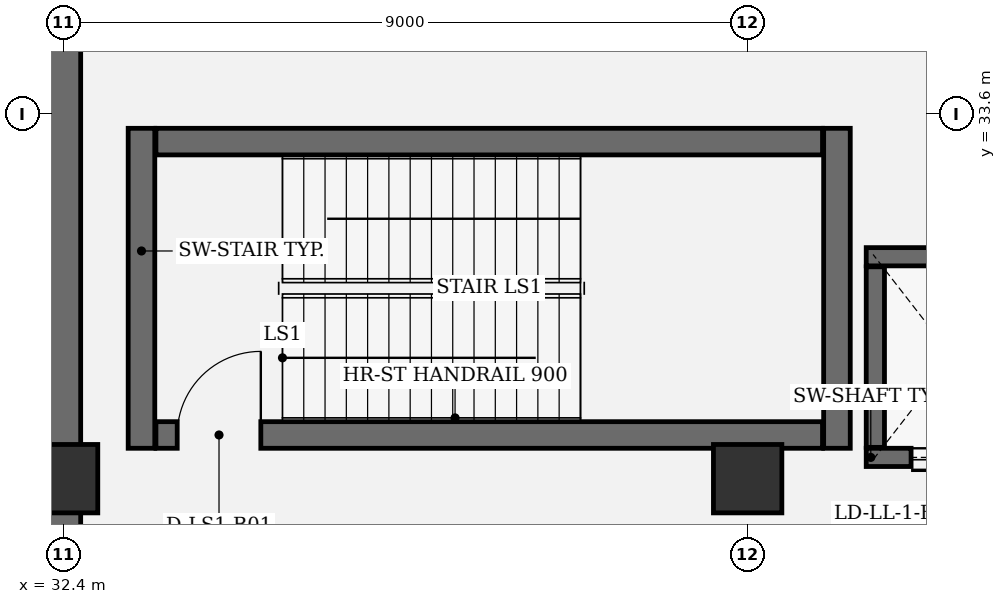
"""IFC4 building model, lengths in metres.
Left out: names, types, materials, properties, quantities, classifications, styles, units other than length and angle.
Written with IfcOpenShell. Run it as: python <this file> out.ifc"""

import sys

from ifc_helpers import new_model, si_unit, direction, frame, frame_2d, origin, origin_2d, place, context, subcontext, project, spatial, rectangle, extrude, element, fill, save


model = new_model("IFC4")
c1 = context("Model", 3, precision=1e-05, world=origin(), true_north=direction((0.0, 1.0)))
c2 = subcontext(c1, "Body", "Model", "MODEL_VIEW")
j1 = project(units=[si_unit("LENGTHUNIT", "METRE"), si_unit("PLANEANGLEUNIT", "RADIAN")], contexts=[c1])
p1 = place(None, origin())
s1 = spatial("IfcSite", under=j1, at=p1, CompositionType="ELEMENT")
p2 = place(p1, origin())
s2 = spatial("IfcBuilding", under=s1, at=p2, CompositionType="ELEMENT")
p3 = place(p2, frame((0.0, 0.0, -5.4)))
s3 = spatial("IfcBuildingStorey", under=s2, at=p3, CompositionType="ELEMENT", Elevation=-5.4)
p4 = place(p3, frame((32.4, 38.16, 0.0), z_axis=(0.0, 0.0, 1.0), x_axis=(0.0, -1.0, 0.0)))
e1 = element("IfcWall", 1, at=p4, inside=s3, PredefinedType="USERDEFINED", context=c2, shape_type="SweptSolid", body=[
    extrude(rectangle(XDim=76.32, YDim=0.45, at=frame_2d((38.16, 0.0))), origin(), (0.0, 0.0, 1.0), 4.35),
])
for number, where, z_axis, x_axis in (
    (2, (32.4, 28.8, 0.0), (0.0, 0.0, 1.0), (1.0, 0.0, 0.0)),
    (3, (41.4, 28.8, 0.0), (0.0, 0.0, 1.0), (1.0, 0.0, 0.0)),
):
    element("IfcColumn", number, at=place(p3, frame(where, z_axis=z_axis, x_axis=x_axis)), inside=s3, PredefinedType="COLUMN", context=c2, shape_type="SweptSolid", body=[
        extrude(rectangle(XDim=0.9, YDim=0.9, at=origin_2d()), origin(), (0.0, 0.0, 1.0), 5.4),
    ])
for number, where, z_axis, x_axis in (
    (4, (33.425, 33.41, 0.0), (0.0, 0.0, 1.0), (0.0, -1.0, 0.0)),
    (5, (42.575, 29.2, 0.0), (0.0, 0.0, 1.0), (0.0, 1.0, 0.0)),
):
    element("IfcWall", number, at=place(p3, frame(where, z_axis=z_axis, x_axis=x_axis)), inside=s3, PredefinedType="SHEAR", context=c2, shape_type="SweptSolid", body=[
        extrude(rectangle(XDim=4.21, YDim=0.35, at=frame_2d((2.105, 0.0))), origin(), (0.0, 0.0, 1.0), 5.395),
    ])
p5 = place(p3, frame((33.615, 29.375, 0.0), z_axis=(0.0, 0.0, 1.0), x_axis=(1.0, 0.0, 0.0)))
e6 = element("IfcWall", 6, at=p5, inside=s3, PredefinedType="SHEAR", context=c2, shape_type="SweptSolid", body=[
    extrude(rectangle(XDim=8.77, YDim=0.35, at=frame_2d((4.385, 0.0))), origin(), (0.0, 0.0, 1.0), 5.395),
])
p6 = place(p5, frame((0.28, 0.0, 0.0)))
e7 = element("IfcOpeningElement", 7, at=p6, cuts=e6, PredefinedType="OPENING", context=c2, shape_type="SweptSolid", body=[
    extrude(rectangle(XDim=1.1, YDim=2.2, at=frame_2d((0.55, 1.1))), frame((0.0, 0.185, 0.0), z_axis=(0.0, -1.0, 0.0), x_axis=(1.0, 0.0, 0.0)), (0.0, 0.0, 1.0), 0.37),
])
p7 = place(p3, frame((42.385, 33.235, 0.0), z_axis=(0.0, 0.0, 1.0), x_axis=(-1.0, 0.0, 0.0)))
e8 = element("IfcWall", 8, at=p7, inside=s3, PredefinedType="SHEAR", context=c2, shape_type="SweptSolid", body=[
    extrude(rectangle(XDim=8.77, YDim=0.35, at=frame_2d((4.385, 0.0))), origin(), (0.0, 0.0, 1.0), 5.395),
])
p8 = place(p3, frame((45.24, 29.08, 0.0), z_axis=(0.0, 0.0, 1.0), x_axis=(-1.0, 0.0, 0.0)))
e9 = element("IfcWall", 9, at=p8, inside=s3, PredefinedType="SHEAR", context=c2, shape_type="SweptSolid", body=[
    extrude(rectangle(XDim=2.28, YDim=0.24, at=frame_2d((1.14, 0.0))), origin(), (0.0, 0.0, 1.0), 5.1),
])
p9 = place(p8, frame((0.59, 0.0, 0.0)))
e10 = element("IfcOpeningElement", 10, at=p9, cuts=e9, PredefinedType="OPENING", context=c2, shape_type="SweptSolid", body=[
    extrude(rectangle(XDim=1.1, YDim=2.2, at=frame_2d((0.55, 1.1))), frame((0.0, 0.13, 0.0), z_axis=(0.0, -1.0, 0.0), x_axis=(1.0, 0.0, 0.0)), (0.0, 0.0, 1.0), 0.26),
])
p10 = place(p3, frame((42.96, 31.72, 0.0), z_axis=(0.0, 0.0, 1.0), x_axis=(1.0, 0.0, 0.0)))
e11 = element("IfcWall", 11, at=p10, inside=s3, PredefinedType="SHEAR", context=c2, shape_type="SweptSolid", body=[
    extrude(rectangle(XDim=2.28, YDim=0.24, at=frame_2d((1.14, 0.0))), origin(), (0.0, 0.0, 1.0), 5.1),
])
p11 = place(p3, frame((43.08, 29.212, 0.0), z_axis=(0.0, 0.0, 1.0), x_axis=(0.0, 1.0, 0.0)))
e12 = element("IfcWall", 12, at=p11, inside=s3, PredefinedType="SHEAR", context=c2, shape_type="SweptSolid", body=[
    extrude(rectangle(XDim=2.376, YDim=0.24, at=frame_2d((1.188, 0.0))), origin(), (0.0, 0.0, 1.0), 5.1),
])
p12 = place(p6, origin())
e13 = element("IfcDoor", 13, at=p12, inside=s3, OperationType="SINGLE_SWING_RIGHT", PredefinedType="DOOR", context=c2, shape_type="SweptSolid", body=[
    extrude(rectangle(XDim=1.1, YDim=2.2, at=frame_2d((0.55, 1.1))), frame((0.0, 0.025, 0.0), z_axis=(0.0, -1.0, 0.0), x_axis=(1.0, 0.0, 0.0)), (0.0, 0.0, 1.0), 0.05),
])
fill(e7, e13)
p13 = place(p9, origin())
e14 = element("IfcDoor", 14, at=p13, inside=s3, OperationType="DOUBLE_DOOR_SLIDING", PredefinedType="DOOR", context=c2, shape_type="SweptSolid", body=[
    extrude(rectangle(XDim=1.1, YDim=2.2, at=frame_2d((0.55, 1.1))), frame((0.0, 0.025, 0.0), z_axis=(0.0, -1.0, 0.0), x_axis=(1.0, 0.0, 0.0)), (0.0, 0.0, 1.0), 0.05),
])
fill(e10, e14)
save(model, sys.argv[1])
